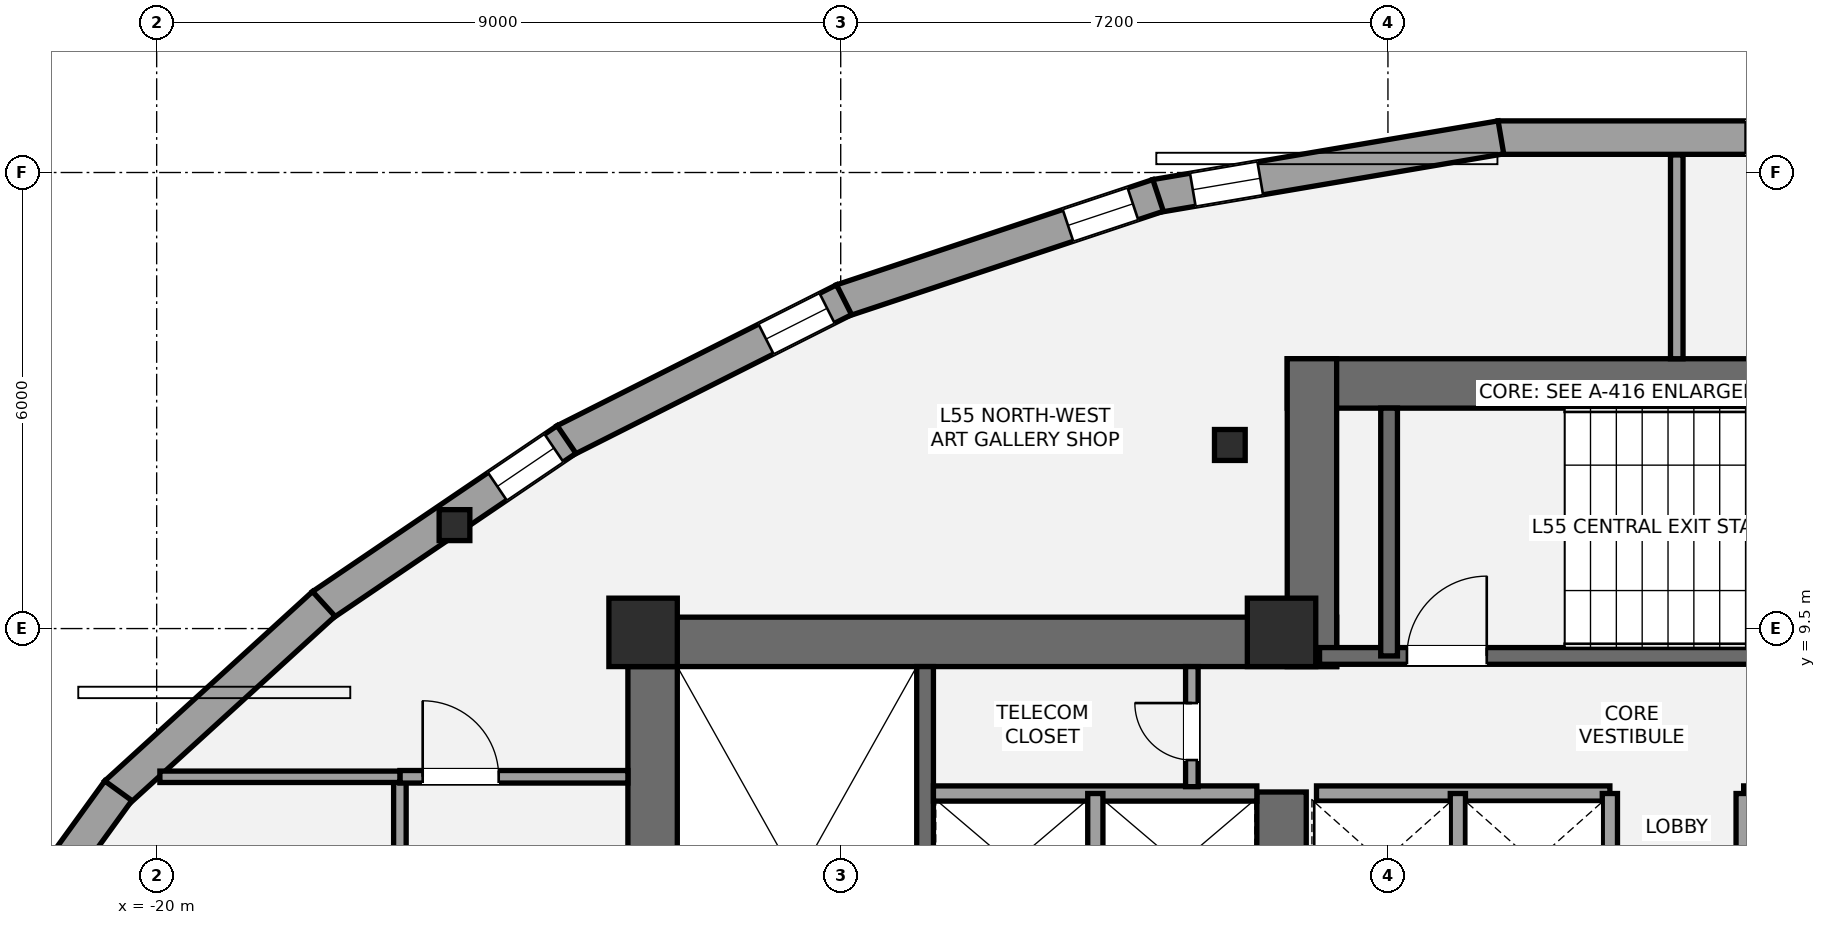
"""IFC4 building model, lengths in metres.
Left out: names, types, materials, properties, quantities, classifications, styles, units other than length and angle.
Written with IfcOpenShell. Run it as: python <this file> out.ifc"""

import sys

from ifc_helpers import new_model, si_unit, direction, frame, frame_2d, origin, origin_2d, place, context, subcontext, project, spatial, rectangle, i_section, extrude, element, fill, save


model = new_model("IFC4")
c1 = context("Model", 3, precision=1e-05, world=origin(), true_north=direction((0.0, 1.0)))
c2 = subcontext(c1, "Body", "Model", "MODEL_VIEW")
j1 = project(units=[si_unit("LENGTHUNIT", "METRE"), si_unit("PLANEANGLEUNIT", "RADIAN")], contexts=[c1])
p1 = place(None, origin())
s1 = spatial("IfcSite", under=j1, at=p1, CompositionType="ELEMENT")
p2 = place(p1, origin())
s2 = spatial("IfcBuilding", under=s1, at=p2, CompositionType="ELEMENT")
p3 = place(p2, frame((0.0, 0.0, 198.2)))
s3 = spatial("IfcBuildingStorey", under=s2, at=p3, CompositionType="ELEMENT", Elevation=198.2)
p4 = place(p3, frame((-13.475, 1.2, 0.0), z_axis=(0.0, 0.0, 1.0), x_axis=(0.0, 1.0, 0.0)))
e1 = element("IfcWall", 1, at=p4, inside=s3, PredefinedType="SHEAR", context=c2, shape_type="SweptSolid", body=[
    extrude(rectangle(XDim=8.45, YDim=0.65, at=frame_2d((4.225, 0.0))), origin(), (0.0, 0.0, 1.0), 3.2),
])
p5 = place(p3, frame((-13.8, 9.325, 0.0), z_axis=(0.0, 0.0, 1.0), x_axis=(1.0, 0.0, 0.0)))
e2 = element("IfcWall", 2, at=p5, inside=s3, PredefinedType="SHEAR", context=c2, shape_type="SweptSolid", body=[
    extrude(rectangle(XDim=9.325, YDim=0.65, at=frame_2d((4.663, 0.0))), origin(), (0.0, 0.0, 1.0), 3.2),
])
p6 = place(p3, frame((-5.2, 5.35, 0.0), z_axis=(0.0, 0.0, 1.0), x_axis=(0.0, 1.0, 0.0)))
e3 = element("IfcWall", 3, at=p6, inside=s3, PredefinedType="SHEAR", context=c2, shape_type="SweptSolid", body=[
    extrude(rectangle(XDim=2.0, YDim=0.65, at=frame_2d((1.0, 0.0))), origin(), (0.0, 0.0, 1.0), 3.2),
])
p7 = place(p3, frame((-9.89, 1.85, 0.0), z_axis=(0.0, 0.0, 1.0), x_axis=(0.0, 1.0, 0.0)))
e4 = element("IfcWall", 4, at=p7, inside=s3, PredefinedType="SHEAR", context=c2, shape_type="SweptSolid", body=[
    extrude(rectangle(XDim=7.15, YDim=0.22, at=frame_2d((3.575, 0.0))), origin(), (0.0, 0.0, 1.0), 3.2),
])
p8 = place(p3, frame((-5.125, 12.725, 0.0), z_axis=(0.0, 0.0, 1.0), x_axis=(1.0, 0.0, 0.0)))
e5 = element("IfcWall", 5, at=p8, inside=s3, PredefinedType="SHEAR", context=c2, shape_type="SweptSolid", body=[
    extrude(rectangle(XDim=10.25, YDim=0.65, at=frame_2d((5.125, 0.0))), origin(), (0.0, 0.0, 1.0), 3.2),
])
p9 = place(p3, frame((-4.8, 9.0, 0.0), z_axis=(0.0, 0.0, 1.0), x_axis=(0.0, 1.0, 0.0)))
e6 = element("IfcWall", 6, at=p9, inside=s3, PredefinedType="SHEAR", context=c2, shape_type="SweptSolid", body=[
    extrude(rectangle(XDim=4.05, YDim=0.65, at=frame_2d((2.025, 0.0))), origin(), (0.0, 0.0, 1.0), 3.2),
])
p10 = place(p3, frame((-4.7, 9.14, 0.0), z_axis=(0.0, 0.0, 1.0), x_axis=(1.0, 0.0, 0.0)))
e7 = element("IfcWall", 7, at=p10, inside=s3, PredefinedType="SHEAR", context=c2, shape_type="SweptSolid", body=[
    extrude(rectangle(XDim=9.3, YDim=0.22, at=frame_2d((4.65, 0.0))), origin(), (0.0, 0.0, 1.0), 3.2),
])
p11 = place(p10, frame((1.15, 0.0, 0.0)))
e8 = element("IfcOpeningElement", 8, at=p11, cuts=e7, PredefinedType="OPENING", context=c2, shape_type="SweptSolid", body=[
    extrude(rectangle(XDim=1.05, YDim=2.15, at=frame_2d((0.525, 1.075))), frame((0.0, 0.12, 0.0), z_axis=(0.0, -1.0, 0.0), x_axis=(1.0, 0.0, 0.0)), (0.0, 0.0, 1.0), 0.24),
])
p12 = place(p3, frame((-3.785, 9.14, 0.0), z_axis=(0.0, 0.0, 1.0), x_axis=(0.0, 1.0, 0.0)))
e9 = element("IfcWall", 9, at=p12, inside=s3, PredefinedType="SHEAR", context=c2, shape_type="SweptSolid", body=[
    extrude(rectangle(XDim=3.26, YDim=0.22, at=frame_2d((1.63, 0.0))), origin(), (0.0, 0.0, 1.0), 3.2),
])
for number, where, z_axis, x_axis in (
    (10, (-13.6, 9.45, 0.0), (0.0, 0.0, 1.0), (1.0, 0.0, 0.0)),
    (11, (-5.2, 9.45, 0.0), (0.0, 0.0, 1.0), (1.0, 0.0, 0.0)),
):
    element("IfcColumn", number, at=place(p3, frame(where, z_axis=z_axis, x_axis=x_axis)), inside=s3, PredefinedType="COLUMN", context=c2, shape_type="SweptSolid", body=[
        extrude(rectangle(XDim=0.9, YDim=0.9, at=origin_2d()), origin(), (0.0, 0.0, 1.0), 3.2),
    ])
for number, where, z_axis, x_axis in (
    (12, (-5.88, 11.915, 0.0), (0.0, 0.0, 1.0), (1.0, 0.0, 0.0)),
    (13, (-16.082, 10.861, 0.0), (0.0, 0.0, 1.0), (1.0, 0.0, 0.0)),
):
    element("IfcColumn", number, at=place(p3, frame(where, z_axis=z_axis, x_axis=x_axis)), inside=s3, PredefinedType="COLUMN", context=c2, shape_type="SweptSolid", body=[
        extrude(i_section(OverallWidth=0.404, OverallDepth=0.407, WebThickness=0.027, FlangeThickness=0.044, at=origin_2d()), origin(), (0.0, 0.0, 1.0), 3.2),
    ])
p13 = place(p3, frame((-2.35, 15.959, 0.0), z_axis=(0.0, 0.0, 1.0), x_axis=(1.0, 0.0, 0.0)))
e14 = element("IfcWall", 14, at=p13, inside=s3, PredefinedType="STANDARD", context=c2, shape_type="SweptSolid", body=[
    extrude(rectangle(XDim=4.701, YDim=0.44, at=frame_2d((2.35, 0.0))), origin(), (0.0, 0.0, 1.0), 2.255),
])
p14 = place(p13, frame((3.256, 0.0, 0.58)))
e15 = element("IfcOpeningElement", 15, at=p14, cuts=e14, PredefinedType="OPENING", context=c2, shape_type="SweptSolid", body=[
    extrude(rectangle(XDim=0.9, YDim=1.35, at=frame_2d((0.45, 0.675))), frame((0.0, 0.23, 0.0), z_axis=(0.0, -1.0, 0.0), x_axis=(1.0, 0.0, 0.0)), (0.0, 0.0, 1.0), 0.46),
])
p15 = place(p3, frame((-6.857, 15.19, 0.0), z_axis=(0.0, 0.0, 1.0), x_axis=(0.985860485502, 0.167568204398, 0.0)))
e16 = element("IfcWall", 16, at=p15, inside=s3, PredefinedType="STANDARD", context=c2, shape_type="SweptSolid", body=[
    extrude(rectangle(XDim=4.608, YDim=0.44, at=frame_2d((2.304, 0.0))), origin(), (0.0, 0.0, 1.0), 2.255),
])
p16 = place(p15, frame((0.496, 0.0, 0.58)))
e17 = element("IfcOpeningElement", 17, at=p16, cuts=e16, PredefinedType="OPENING", context=c2, shape_type="SweptSolid", body=[
    extrude(rectangle(XDim=0.9, YDim=1.35, at=frame_2d((0.45, 0.675))), frame((0.0, 0.23, 0.0), z_axis=(0.0, -1.0, 0.0), x_axis=(1.0, 0.0, 0.0)), (0.0, 0.0, 1.0), 0.46),
])
p17 = place(p3, frame((-10.986, 13.814, 0.0), z_axis=(0.0, 0.0, 1.0), x_axis=(0.94886128517, 0.315693302916, 0.0)))
e18 = element("IfcWall", 18, at=p17, inside=s3, PredefinedType="STANDARD", context=c2, shape_type="SweptSolid", body=[
    extrude(rectangle(XDim=4.386, YDim=0.44, at=frame_2d((2.193, 0.0))), origin(), (0.0, 0.0, 1.0), 2.255),
])
p18 = place(p17, frame((3.136, 0.0, 0.58)))
e19 = element("IfcOpeningElement", 19, at=p18, cuts=e18, PredefinedType="OPENING", context=c2, shape_type="SweptSolid", body=[
    extrude(rectangle(XDim=0.9, YDim=1.35, at=frame_2d((0.45, 0.675))), frame((0.0, 0.23, 0.0), z_axis=(0.0, -1.0, 0.0), x_axis=(1.0, 0.0, 0.0)), (0.0, 0.0, 1.0), 0.46),
])
p19 = place(p3, frame((-14.632, 11.973, 0.0), z_axis=(0.0, 0.0, 1.0), x_axis=(0.892939479035, 0.450176728387, 0.0)))
e20 = element("IfcWall", 20, at=p19, inside=s3, PredefinedType="STANDARD", context=c2, shape_type="SweptSolid", body=[
    extrude(rectangle(XDim=4.116, YDim=0.44, at=frame_2d((2.058, 0.0))), origin(), (0.0, 0.0, 1.0), 2.255),
])
p20 = place(p19, frame((2.967, 0.0, 0.58)))
e21 = element("IfcOpeningElement", 21, at=p20, cuts=e20, PredefinedType="OPENING", context=c2, shape_type="SweptSolid", body=[
    extrude(rectangle(XDim=0.9, YDim=1.35, at=frame_2d((0.45, 0.675))), frame((0.0, 0.23, 0.0), z_axis=(0.0, -1.0, 0.0), x_axis=(1.0, 0.0, 0.0)), (0.0, 0.0, 1.0), 0.46),
])
p21 = place(p3, frame((-17.826, 9.805, 0.0), z_axis=(0.0, 0.0, 1.0), x_axis=(0.827697624009, 0.561174342972, 0.0)))
e22 = element("IfcWall", 22, at=p21, inside=s3, PredefinedType="STANDARD", context=c2, shape_type="SweptSolid", body=[
    extrude(rectangle(XDim=3.888, YDim=0.44, at=frame_2d((1.944, 0.0))), origin(), (0.0, 0.0, 1.0), 2.255),
])
p22 = place(p21, frame((2.789, 0.0, 0.58)))
e23 = element("IfcOpeningElement", 23, at=p22, cuts=e22, PredefinedType="OPENING", context=c2, shape_type="SweptSolid", body=[
    extrude(rectangle(XDim=0.9, YDim=1.35, at=frame_2d((0.45, 0.675))), frame((0.0, 0.23, 0.0), z_axis=(0.0, -1.0, 0.0), x_axis=(1.0, 0.0, 0.0)), (0.0, 0.0, 1.0), 0.46),
])
p23 = place(p3, frame((-20.535, 7.333, 0.0), z_axis=(0.0, 0.0, 1.0), x_axis=(0.738992571182, 0.67371357396, 0.0)))
e24 = element("IfcWall", 24, at=p23, inside=s3, PredefinedType="STANDARD", context=c2, shape_type="SweptSolid", body=[
    extrude(rectangle(XDim=3.699, YDim=0.44, at=frame_2d((1.849, 0.0))), origin(), (0.0, 0.0, 1.0), 2.255),
])
p24 = place(p3, frame((-22.547, 4.545, 0.0), z_axis=(0.0, 0.0, 1.0), x_axis=(0.586378206793, 0.810037405678, 0.0)))
e25 = element("IfcWall", 25, at=p24, inside=s3, PredefinedType="STANDARD", context=c2, shape_type="SweptSolid", body=[
    extrude(rectangle(XDim=3.483, YDim=0.44, at=frame_2d((1.742, 0.0))), origin(), (0.0, 0.0, 1.0), 2.255),
])
p25 = place(p3, frame((-9.78, 7.33, 0.0), z_axis=(0.0, 0.0, 1.0), x_axis=(1.0, 0.0, 0.0)))
e26 = element("IfcWall", 26, at=p25, inside=s3, PredefinedType="SOLIDWALL", context=c2, shape_type="SweptSolid", body=[
    extrude(rectangle(XDim=4.255, YDim=0.2, at=frame_2d((2.127, 0.0))), origin(), (0.0, 0.0, 1.0), 2.96),
])
p26 = place(p3, frame((-7.65, 5.47, 0.0), z_axis=(0.0, 0.0, 1.0), x_axis=(0.0, 1.0, 0.0)))
e27 = element("IfcWall", 27, at=p26, inside=s3, PredefinedType="SOLIDWALL", context=c2, shape_type="SweptSolid", body=[
    extrude(rectangle(XDim=1.86, YDim=0.2, at=frame_2d((0.93, 0.0))), origin(), (0.0, 0.0, 1.0), 2.96),
])
for number, where, z_axis, x_axis in (
    (28, (-4.74, 7.33, 0.0), (0.0, 0.0, 1.0), (1.0, 0.0, 0.0)),
    (29, (0.88, 7.33, 0.0), (0.0, 0.0, 1.0), (1.0, 0.0, 0.0)),
):
    element("IfcWall", number, at=place(p3, frame(where, z_axis=z_axis, x_axis=x_axis)), inside=s3, PredefinedType="SOLIDWALL", context=c2, shape_type="SweptSolid", body=[
        extrude(rectangle(XDim=3.86, YDim=0.2, at=frame_2d((1.93, 0.0))), origin(), (0.0, 0.0, 1.0), 2.96),
    ])
for number, where, z_axis, x_axis in (
    (30, (-2.88, 5.52, 0.0), (0.0, 0.0, 1.0), (0.0, 1.0, 0.0)),
    (31, (-0.88, 5.52, 0.0), (0.0, 0.0, 1.0), (0.0, 1.0, 0.0)),
    (32, (0.88, 5.52, 0.0), (0.0, 0.0, 1.0), (0.0, 1.0, 0.0)),
):
    element("IfcWall", number, at=place(p3, frame(where, z_axis=z_axis, x_axis=x_axis)), inside=s3, PredefinedType="SOLIDWALL", context=c2, shape_type="SweptSolid", body=[
        extrude(rectangle(XDim=1.81, YDim=0.2, at=frame_2d((0.905, 0.0))), origin(), (0.0, 0.0, 1.0), 2.96),
    ])
p27 = place(p3, frame((-6.38, 7.42, 0.0), z_axis=(0.0, 0.0, 1.0), x_axis=(0.0, 1.0, 0.0)))
e33 = element("IfcWall", 33, at=p27, inside=s3, PredefinedType="PARTITIONING", context=c2, shape_type="SweptSolid", body=[
    extrude(rectangle(XDim=1.58, YDim=0.165, at=frame_2d((0.79, 0.0))), origin(), (0.0, 0.0, 1.0), 2.96),
])
p28 = place(p27, frame((0.35, 0.0, 0.0)))
e34 = element("IfcOpeningElement", 34, at=p28, cuts=e33, PredefinedType="OPENING", context=c2, shape_type="SweptSolid", body=[
    extrude(rectangle(XDim=0.75, YDim=2.1, at=frame_2d((0.375, 1.05))), frame((0.0, 0.093, 0.0), z_axis=(0.0, -1.0, 0.0), x_axis=(1.0, 0.0, 0.0)), (0.0, 0.0, 1.0), 0.185),
])
p29 = place(p3, frame((-16.8, -10.225, 0.0), z_axis=(0.0, 0.0, 1.0), x_axis=(0.0, 1.0, 0.0)))
e35 = element("IfcWall", 35, at=p29, inside=s3, PredefinedType="PARTITIONING", context=c2, shape_type="SweptSolid", body=[
    extrude(rectangle(XDim=17.775, YDim=0.165, at=frame_2d((8.888, 0.0))), origin(), (0.0, 0.0, 1.0), 2.338),
])
p30 = place(p29, frame((1.274, 0.0, 0.0)))
e36 = element("IfcOpeningElement", 36, at=p30, cuts=e35, PredefinedType="OPENING", context=c2, shape_type="SweptSolid", body=[
    extrude(rectangle(XDim=0.85, YDim=2.1, at=frame_2d((0.425, 1.05))), frame((0.0, 0.093, 0.0), z_axis=(0.0, -1.0, 0.0), x_axis=(1.0, 0.0, 0.0)), (0.0, 0.0, 1.0), 0.185),
])
p31 = place(p29, frame((6.725, 0.0, 0.0)))
e37 = element("IfcOpeningElement", 37, at=p31, cuts=e35, PredefinedType="OPENING", context=c2, shape_type="SweptSolid", body=[
    extrude(rectangle(XDim=1.0, YDim=2.15, at=frame_2d((0.5, 1.075))), frame((0.0, 0.093, 0.0), z_axis=(0.0, -1.0, 0.0), x_axis=(1.0, 0.0, 0.0)), (0.0, 0.0, 1.0), 0.185),
])
p32 = place(p29, frame((14.3, 0.0, 0.0)))
e38 = element("IfcOpeningElement", 38, at=p32, cuts=e35, PredefinedType="OPENING", context=c2, shape_type="SweptSolid", body=[
    extrude(rectangle(XDim=1.0, YDim=2.15, at=frame_2d((0.5, 1.075))), frame((0.0, 0.093, 0.0), z_axis=(0.0, -1.0, 0.0), x_axis=(1.0, 0.0, 0.0)), (0.0, 0.0, 1.0), 0.185),
])
p33 = place(p3, frame((-16.8, 7.55, 0.0), z_axis=(0.0, 0.0, 1.0), x_axis=(1.0, 0.0, 0.0)))
e39 = element("IfcWall", 39, at=p33, inside=s3, PredefinedType="PARTITIONING", context=c2, shape_type="SweptSolid", body=[
    extrude(rectangle(XDim=3.0, YDim=0.165, at=frame_2d((1.5, 0.0))), origin(), (0.0, 0.0, 1.0), 2.413),
])
p34 = place(p33, frame((0.3, 0.0, 0.0)))
e40 = element("IfcOpeningElement", 40, at=p34, cuts=e39, PredefinedType="OPENING", context=c2, shape_type="SweptSolid", body=[
    extrude(rectangle(XDim=1.0, YDim=2.15, at=frame_2d((0.5, 1.075))), frame((0.0, 0.093, 0.0), z_axis=(0.0, -1.0, 0.0), x_axis=(1.0, 0.0, 0.0)), (0.0, 0.0, 1.0), 0.185),
])
p35 = place(p3, frame((-19.958, 7.55, 0.0), z_axis=(0.0, 0.0, 1.0), x_axis=(1.0, 0.0, 0.0)))
e41 = element("IfcWall", 41, at=p35, inside=s3, PredefinedType="PLUMBINGWALL", context=c2, shape_type="SweptSolid", body=[
    extrude(rectangle(XDim=3.158, YDim=0.15, at=frame_2d((1.579, 0.0))), origin(), (0.0, 0.0, 1.0), 2.413),
])
p36 = place(p3, frame((0.0, 13.05, 0.0), z_axis=(0.0, 0.0, 1.0), x_axis=(0.0, 1.0, 0.0)))
e42 = element("IfcWall", 42, at=p36, inside=s3, PredefinedType="PARTITIONING", context=c2, shape_type="SweptSolid", body=[
    extrude(rectangle(XDim=2.681, YDim=0.165, at=frame_2d((1.341, 0.0))), origin(), (0.0, 0.0, 1.0), 2.96),
])
p37 = place(p14, origin())
e43 = element("IfcWindow", 43, at=p37, inside=s3, PartitioningType="SINGLE_PANEL", PredefinedType="WINDOW", context=c2, shape_type="SweptSolid", body=[
    extrude(rectangle(XDim=0.9, YDim=1.35, at=frame_2d((0.45, 0.675))), frame((0.0, -0.01, 0.0), z_axis=(0.0, -1.0, 0.0), x_axis=(1.0, 0.0, 0.0)), (0.0, 0.0, 1.0), 0.06),
])
fill(e15, e43)
p38 = place(p16, origin())
e44 = element("IfcWindow", 44, at=p38, inside=s3, PartitioningType="SINGLE_PANEL", PredefinedType="WINDOW", context=c2, shape_type="SweptSolid", body=[
    extrude(rectangle(XDim=0.9, YDim=1.35, at=frame_2d((0.45, 0.675))), frame((0.0, -0.01, 0.0), z_axis=(0.0, -1.0, 0.0), x_axis=(1.0, 0.0, 0.0)), (0.0, 0.0, 1.0), 0.06),
])
fill(e17, e44)
p39 = place(p18, origin())
e45 = element("IfcWindow", 45, at=p39, inside=s3, PartitioningType="SINGLE_PANEL", PredefinedType="WINDOW", context=c2, shape_type="SweptSolid", body=[
    extrude(rectangle(XDim=0.9, YDim=1.35, at=frame_2d((0.45, 0.675))), frame((0.0, -0.01, 0.0), z_axis=(0.0, -1.0, 0.0), x_axis=(1.0, 0.0, 0.0)), (0.0, 0.0, 1.0), 0.06),
])
fill(e19, e45)
p40 = place(p20, origin())
e46 = element("IfcWindow", 46, at=p40, inside=s3, PartitioningType="SINGLE_PANEL", PredefinedType="WINDOW", context=c2, shape_type="SweptSolid", body=[
    extrude(rectangle(XDim=0.9, YDim=1.35, at=frame_2d((0.45, 0.675))), frame((0.0, -0.01, 0.0), z_axis=(0.0, -1.0, 0.0), x_axis=(1.0, 0.0, 0.0)), (0.0, 0.0, 1.0), 0.06),
])
fill(e21, e46)
p41 = place(p22, origin())
e47 = element("IfcWindow", 47, at=p41, inside=s3, PartitioningType="SINGLE_PANEL", PredefinedType="WINDOW", context=c2, shape_type="SweptSolid", body=[
    extrude(rectangle(XDim=0.9, YDim=1.35, at=frame_2d((0.45, 0.675))), frame((0.0, -0.01, 0.0), z_axis=(0.0, -1.0, 0.0), x_axis=(1.0, 0.0, 0.0)), (0.0, 0.0, 1.0), 0.06),
])
fill(e23, e47)
p42 = place(p11, origin())
e48 = element("IfcDoor", 48, at=p42, inside=s3, OperationType="SINGLE_SWING_RIGHT", PredefinedType="DOOR", context=c2, shape_type="SweptSolid", body=[
    extrude(rectangle(XDim=1.05, YDim=2.15, at=frame_2d((0.525, 1.075))), frame((0.0, 0.025, 0.0), z_axis=(0.0, -1.0, 0.0), x_axis=(1.0, 0.0, 0.0)), (0.0, 0.0, 1.0), 0.05),
])
fill(e8, e48)
p43 = place(p28, origin())
e49 = element("IfcDoor", 49, at=p43, inside=s3, OperationType="SINGLE_SWING_RIGHT", PredefinedType="DOOR", context=c2, shape_type="SweptSolid", body=[
    extrude(rectangle(XDim=0.75, YDim=2.1, at=frame_2d((0.375, 1.05))), frame((0.0, 0.025, 0.0), z_axis=(0.0, -1.0, 0.0), x_axis=(1.0, 0.0, 0.0)), (0.0, 0.0, 1.0), 0.05),
])
fill(e34, e49)
p44 = place(p34, origin())
e50 = element("IfcDoor", 50, at=p44, inside=s3, OperationType="SINGLE_SWING_LEFT", PredefinedType="DOOR", context=c2, shape_type="SweptSolid", body=[
    extrude(rectangle(XDim=1.0, YDim=2.15, at=frame_2d((0.5, 1.075))), frame((0.0, 0.025, 0.0), z_axis=(0.0, -1.0, 0.0), x_axis=(1.0, 0.0, 0.0)), (0.0, 0.0, 1.0), 0.05),
])
fill(e40, e50)
save(model, sys.argv[1])
